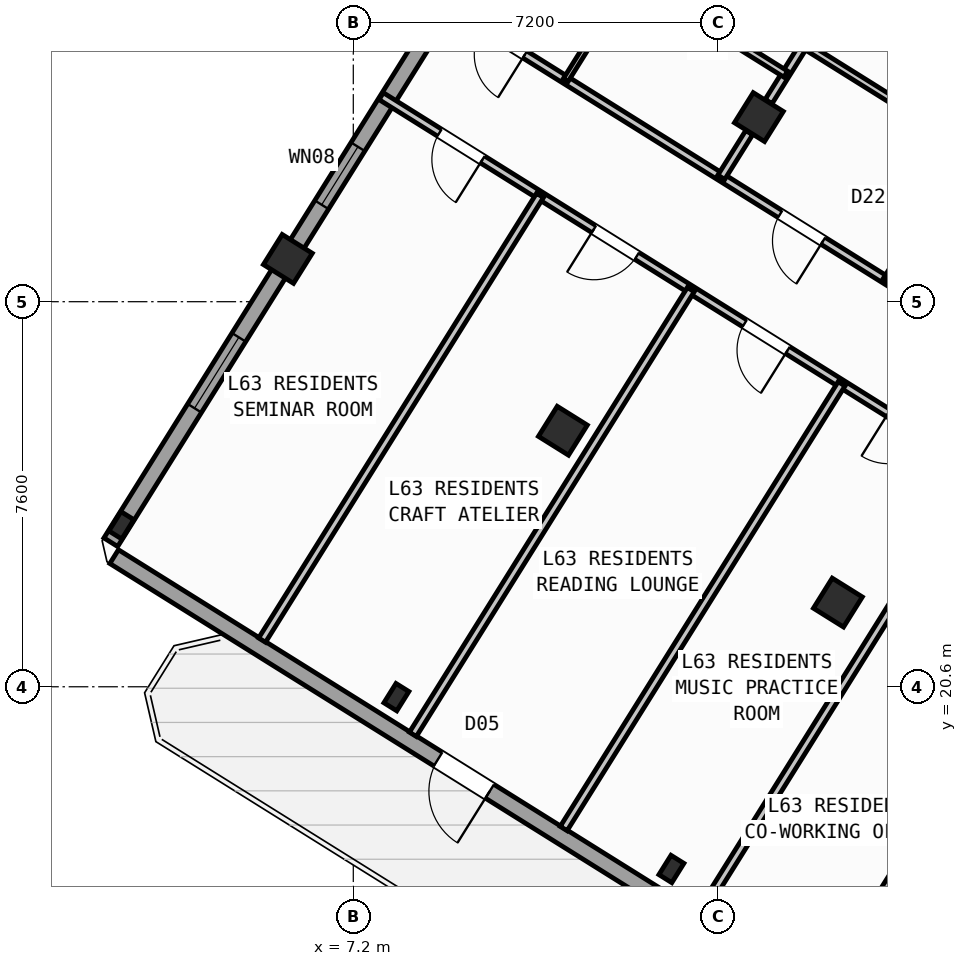
"""IFC4 building model, lengths in metres.
Left out: names, types, materials, properties, quantities, classifications, styles, units other than length and angle.
Written with IfcOpenShell. Run it as: python <this file> out.ifc"""

import sys

from ifc_helpers import new_model, si_unit, direction, frame, frame_2d, origin, origin_2d, place, context, subcontext, project, spatial, rectangle, hollow_rectangle, i_section, extrude, source, transform, mapped, element, fill, save


model = new_model("IFC4")
c1 = context("Model", 3, precision=1e-05, world=origin(), true_north=direction((0.0, 1.0)))
c2 = subcontext(c1, "Body", "Model", "MODEL_VIEW")
j1 = project(units=[si_unit("LENGTHUNIT", "METRE"), si_unit("PLANEANGLEUNIT", "RADIAN")], contexts=[c1])
p1 = place(None, origin())
s1 = spatial("IfcSite", under=j1, at=p1, CompositionType="ELEMENT")
p2 = place(p1, origin())
s2 = spatial("IfcBuilding", under=s1, at=p2, CompositionType="ELEMENT")
p3 = place(p2, frame((0.0, 0.0, 251.1)))
s3 = spatial("IfcBuildingStorey", under=s2, at=p3, CompositionType="ELEMENT", Elevation=251.1)
m1 = source(origin(), c2, "Body", "SweptSolid", [
    extrude(hollow_rectangle(XDim=0.7, YDim=0.7, WallThickness=0.028, at=origin_2d()), origin(), (0.0, 0.0, 1.0), 3.6),
])
p4 = place(p3, frame((16.764, 22.261, 0.0), z_axis=(0.0, 0.0, 1.0), x_axis=(-0.848048096156, 0.529919264233, 0.0)))
e1 = element("IfcColumn", 1, at=p4, inside=s3, PredefinedType="COLUMN", context=c2, shape_type="MappedRepresentation", body=[
    mapped(m1, transform((0.0, 0.0, 0.0), scale=1.0)),
])
m2 = source(origin(), c2, "Body", "SweptSolid", [
    extrude(i_section(OverallWidth=0.3, OverallDepth=0.45, WebThickness=0.014, FlangeThickness=0.026, at=origin_2d()), origin(), (0.0, 0.0, 1.0), 3.6),
])
p5 = place(p3, frame((13.478, 17.003, 0.0), z_axis=(0.0, 0.0, 1.0), x_axis=(-0.848048096156, 0.529919264233, 0.0)))
e2 = element("IfcColumn", 2, at=p5, inside=s3, PredefinedType="COLUMN", context=c2, shape_type="MappedRepresentation", body=[
    mapped(m2, transform((0.0, 0.0, 0.0), scale=1.0)),
])
for number, where, z_axis, x_axis in (
    (3, (15.205, 31.844, 0.0), (0.0, 0.0, 1.0), (-0.848, 0.53, 0.0)),
    (4, (11.336, 25.653, 0.0), (0.0, 0.0, 1.0), (-0.848, 0.53, 0.0)),
):
    element("IfcColumn", number, at=place(p3, frame(where, z_axis=z_axis, x_axis=x_axis)), inside=s3, PredefinedType="COLUMN", context=c2, shape_type="MappedRepresentation", body=[
        mapped(m1, transform((0.0, 0.0, 0.0), scale=1.0)),
    ])
p6 = place(p3, frame((8.051, 20.395, 0.0), z_axis=(0.0, 0.0, 1.0), x_axis=(-0.848048096156, 0.529919264233, 0.0)))
e5 = element("IfcColumn", 5, at=p6, inside=s3, PredefinedType="COLUMN", context=c2, shape_type="MappedRepresentation", body=[
    mapped(m2, transform((0.0, 0.0, 0.0), scale=1.0)),
])
p7 = place(p3, frame((5.909, 29.044, 0.0), z_axis=(0.0, 0.0, 1.0), x_axis=(-0.848048096156, 0.529919264233, 0.0)))
e6 = element("IfcColumn", 6, at=p7, inside=s3, PredefinedType="COLUMN", context=c2, shape_type="MappedRepresentation", body=[
    mapped(m1, transform((0.0, 0.0, 0.0), scale=1.0)),
])
p8 = place(p3, frame((2.623, 23.786, 0.0), z_axis=(0.0, 0.0, 1.0), x_axis=(-0.848048096156, 0.529919264233, 0.0)))
e7 = element("IfcColumn", 7, at=p8, inside=s3, PredefinedType="COLUMN", context=c2, shape_type="MappedRepresentation", body=[
    mapped(m2, transform((0.0, 0.0, 0.0), scale=1.0)),
])
p9 = place(p3, frame((29.268, 6.429, 0.0), z_axis=(0.0, 0.0, 1.0), x_axis=(-0.848049971435, 0.529916263149, 0.0)))
e8 = element("IfcWall", 8, at=p9, inside=s3, PredefinedType="STANDARD", context=c2, shape_type="SweptSolid", body=[
    extrude(rectangle(XDim=31.588, YDim=0.32, at=frame_2d((15.794, 0.0))), origin(), (0.0, 0.0, 1.0), 3.32),
])
p10 = place(p9, frame((22.848, 0.0, 0.0)))
e9 = element("IfcOpeningElement", 9, at=p10, cuts=e8, PredefinedType="OPENING", context=c2, shape_type="SweptSolid", body=[
    extrude(rectangle(XDim=1.2, YDim=2.15, at=frame_2d((0.6, 1.075))), frame((0.0, 0.17, 0.0), z_axis=(0.0, -1.0, 0.0), x_axis=(1.0, 0.0, 0.0)), (0.0, 0.0, 1.0), 0.34),
])
p11 = place(p9, frame((3.178, 0.0, 0.9)))
e10 = element("IfcOpeningElement", 10, at=p11, cuts=e8, PredefinedType="OPENING", context=c2, shape_type="SweptSolid", body=[
    extrude(rectangle(XDim=1.65, YDim=1.45, at=frame_2d((0.825, 0.725))), frame((0.0, 0.17, 0.0), z_axis=(0.0, -1.0, 0.0), x_axis=(1.0, 0.0, 0.0)), (0.0, 0.0, 1.0), 0.34),
])
p12 = place(p9, frame((8.478, 0.0, 0.9)))
e11 = element("IfcOpeningElement", 11, at=p12, cuts=e8, PredefinedType="OPENING", context=c2, shape_type="SweptSolid", body=[
    extrude(rectangle(XDim=1.65, YDim=1.45, at=frame_2d((0.825, 0.725))), frame((0.0, 0.17, 0.0), z_axis=(0.0, -1.0, 0.0), x_axis=(1.0, 0.0, 0.0)), (0.0, 0.0, 1.0), 0.34),
])
p13 = place(p3, frame((2.415, 23.452, 0.0), z_axis=(0.0, 0.0, 1.0), x_axis=(0.52991049553, 0.848053575387, 0.0)))
e12 = element("IfcWall", 12, at=p13, inside=s3, PredefinedType="STANDARD", context=c2, shape_type="SweptSolid", body=[
    extrude(rectangle(XDim=21.587, YDim=0.32, at=frame_2d((10.794, 0.0))), origin(), (0.0, 0.0, 1.0), 2.845),
])
p14 = place(p13, frame((3.119, 0.0, 0.9)))
e13 = element("IfcOpeningElement", 13, at=p14, cuts=e12, PredefinedType="OPENING", context=c2, shape_type="SweptSolid", body=[
    extrude(rectangle(XDim=1.65, YDim=1.45, at=frame_2d((0.825, 0.725))), frame((0.0, 0.17, 0.0), z_axis=(0.0, -1.0, 0.0), x_axis=(1.0, 0.0, 0.0)), (0.0, 0.0, 1.0), 0.34),
])
p15 = place(p13, frame((7.854, 0.0, 0.9)))
e14 = element("IfcOpeningElement", 14, at=p15, cuts=e12, PredefinedType="OPENING", context=c2, shape_type="SweptSolid", body=[
    extrude(rectangle(XDim=1.35, YDim=1.45, at=frame_2d((0.675, 0.725))), frame((0.0, 0.17, 0.0), z_axis=(0.0, -1.0, 0.0), x_axis=(1.0, 0.0, 0.0)), (0.0, 0.0, 1.0), 0.34),
])
p16 = place(p13, frame((16.979, 0.0, 0.95)))
e15 = element("IfcOpeningElement", 15, at=p16, cuts=e12, PredefinedType="OPENING", context=c2, shape_type="SweptSolid", body=[
    extrude(rectangle(XDim=1.95, YDim=1.35, at=frame_2d((0.975, 0.675))), frame((0.0, 0.17, 0.0), z_axis=(0.0, -1.0, 0.0), x_axis=(1.0, 0.0, 0.0)), (0.0, 0.0, 1.0), 0.34),
])
p17 = place(p3, frame((14.138, 41.825, 0.0), z_axis=(0.0, 0.0, 1.0), x_axis=(0.848046498049, -0.529921821731, 0.0)))
e16 = element("IfcWall", 16, at=p17, inside=s3, PredefinedType="STANDARD", context=c2, shape_type="SweptSolid", body=[
    extrude(rectangle(XDim=31.588, YDim=0.32, at=frame_2d((15.794, 0.0))), origin(), (0.0, 0.0, 1.0), 3.32),
])
p18 = place(p17, frame((3.46, 0.0, 0.0)))
e17 = element("IfcOpeningElement", 17, at=p18, cuts=e16, PredefinedType="OPENING", context=c2, shape_type="SweptSolid", body=[
    extrude(rectangle(XDim=1.05, YDim=2.15, at=frame_2d((0.525, 1.075))), frame((0.0, 0.17, 0.0), z_axis=(0.0, -1.0, 0.0), x_axis=(1.0, 0.0, 0.0)), (0.0, 0.0, 1.0), 0.34),
])
p19 = place(p17, frame((0.831, 0.0, 1.0)))
e18 = element("IfcOpeningElement", 18, at=p19, cuts=e16, PredefinedType="OPENING", context=c2, shape_type="SweptSolid", body=[
    extrude(rectangle(XDim=0.9, YDim=1.25, at=frame_2d((0.45, 0.625))), frame((0.0, 0.17, 0.0), z_axis=(0.0, -1.0, 0.0), x_axis=(1.0, 0.0, 0.0)), (0.0, 0.0, 1.0), 0.34),
])
p20 = place(p17, frame((9.837, 0.0, 0.9)))
e19 = element("IfcOpeningElement", 19, at=p20, cuts=e16, PredefinedType="OPENING", context=c2, shape_type="SweptSolid", body=[
    extrude(rectangle(XDim=1.35, YDim=1.45, at=frame_2d((0.675, 0.725))), frame((0.0, 0.17, 0.0), z_axis=(0.0, -1.0, 0.0), x_axis=(1.0, 0.0, 0.0)), (0.0, 0.0, 1.0), 0.34),
])
p21 = place(p17, frame((13.599, 0.0, 0.95)))
e20 = element("IfcOpeningElement", 20, at=p21, cuts=e16, PredefinedType="OPENING", context=c2, shape_type="SweptSolid", body=[
    extrude(rectangle(XDim=1.95, YDim=1.35, at=frame_2d((0.975, 0.675))), frame((0.0, 0.17, 0.0), z_axis=(0.0, -1.0, 0.0), x_axis=(1.0, 0.0, 0.0)), (0.0, 0.0, 1.0), 0.34),
])
p22 = place(p17, frame((17.154, 0.0, 1.0)))
e21 = element("IfcOpeningElement", 21, at=p22, cuts=e16, PredefinedType="OPENING", context=c2, shape_type="SweptSolid", body=[
    extrude(rectangle(XDim=0.9, YDim=1.25, at=frame_2d((0.45, 0.625))), frame((0.0, 0.17, 0.0), z_axis=(0.0, -1.0, 0.0), x_axis=(1.0, 0.0, 0.0)), (0.0, 0.0, 1.0), 0.34),
])
p23 = place(p17, frame((21.651, 0.0, 0.9)))
e22 = element("IfcOpeningElement", 22, at=p23, cuts=e16, PredefinedType="OPENING", context=c2, shape_type="SweptSolid", body=[
    extrude(rectangle(XDim=1.65, YDim=1.45, at=frame_2d((0.825, 0.725))), frame((0.0, 0.17, 0.0), z_axis=(0.0, -1.0, 0.0), x_axis=(1.0, 0.0, 0.0)), (0.0, 0.0, 1.0), 0.34),
])
p24 = place(p17, frame((27.215, 0.0, 0.9)))
e23 = element("IfcOpeningElement", 23, at=p24, cuts=e16, PredefinedType="OPENING", context=c2, shape_type="SweptSolid", body=[
    extrude(rectangle(XDim=1.65, YDim=1.45, at=frame_2d((0.825, 0.725))), frame((0.0, 0.17, 0.0), z_axis=(0.0, -1.0, 0.0), x_axis=(1.0, 0.0, 0.0)), (0.0, 0.0, 1.0), 0.34),
])
p25 = place(p3, frame((21.938, 23.391, 0.0), z_axis=(0.0, 0.0, 1.0), x_axis=(-0.529924725692, -0.848044683434, 0.0)))
e24 = element("IfcWall", 24, at=p25, inside=s3, PredefinedType="PARTITIONING", context=c2, shape_type="SweptSolid", body=[
    extrude(rectangle(XDim=10.35, YDim=0.16, at=frame_2d((5.175, 0.0))), origin(), (0.0, 0.0, 1.0), 3.31),
])
p26 = place(p3, frame((23.104, 25.256, 0.0), z_axis=(0.0, 0.0, 1.0), x_axis=(-0.848041752158, 0.529929416617, 0.0)))
e25 = element("IfcWall", 25, at=p26, inside=s3, PredefinedType="PARTITIONING", context=c2, shape_type="SweptSolid", body=[
    extrude(rectangle(XDim=16.73, YDim=0.16, at=frame_2d((8.365, 0.0))), origin(), (0.0, 0.0, 1.0), 3.31),
])
p27 = place(p26, frame((1.395, 0.0, 0.0)))
e26 = element("IfcOpeningElement", 26, at=p27, cuts=e25, PredefinedType="OPENING", context=c2, shape_type="SweptSolid", body=[
    extrude(rectangle(XDim=1.0, YDim=2.1, at=frame_2d((0.5, 1.05))), frame((0.0, 0.09, 0.0), z_axis=(0.0, -1.0, 0.0), x_axis=(1.0, 0.0, 0.0)), (0.0, 0.0, 1.0), 0.18),
])
p28 = place(p26, frame((7.82, 0.0, 0.0)))
e27 = element("IfcOpeningElement", 27, at=p28, cuts=e25, PredefinedType="OPENING", context=c2, shape_type="SweptSolid", body=[
    extrude(rectangle(XDim=1.0, YDim=2.1, at=frame_2d((0.5, 1.05))), frame((0.0, 0.09, 0.0), z_axis=(0.0, -1.0, 0.0), x_axis=(1.0, 0.0, 0.0)), (0.0, 0.0, 1.0), 0.18),
])
p29 = place(p26, frame((14.76, 0.0, 0.0)))
e28 = element("IfcOpeningElement", 28, at=p29, cuts=e25, PredefinedType="OPENING", context=c2, shape_type="SweptSolid", body=[
    extrude(rectangle(XDim=1.0, YDim=2.1, at=frame_2d((0.5, 1.05))), frame((0.0, 0.09, 0.0), z_axis=(0.0, -1.0, 0.0), x_axis=(1.0, 0.0, 0.0)), (0.0, 0.0, 1.0), 0.18),
])
p30 = place(p3, frame((21.938, 23.391, 0.0), z_axis=(0.0, 0.0, 1.0), x_axis=(-0.848045850158, 0.529922858565, 0.0)))
e29 = element("IfcWall", 29, at=p30, inside=s3, PredefinedType="PARTITIONING", context=c2, shape_type="SweptSolid", body=[
    extrude(rectangle(XDim=16.73, YDim=0.16, at=frame_2d((8.365, 0.0))), origin(), (0.0, 0.0, 1.0), 3.31),
])
p31 = place(p30, frame((0.92, 0.0, 0.0)))
e30 = element("IfcOpeningElement", 30, at=p31, cuts=e29, PredefinedType="OPENING", context=c2, shape_type="SweptSolid", body=[
    extrude(rectangle(XDim=1.0, YDim=2.1, at=frame_2d((0.5, 1.05))), frame((0.0, 0.09, 0.0), z_axis=(0.0, -1.0, 0.0), x_axis=(1.0, 0.0, 0.0)), (0.0, 0.0, 1.0), 0.18),
])
p32 = place(p30, frame((3.928, 0.0, 0.0)))
e31 = element("IfcOpeningElement", 31, at=p32, cuts=e29, PredefinedType="OPENING", context=c2, shape_type="SweptSolid", body=[
    extrude(rectangle(XDim=1.0, YDim=2.1, at=frame_2d((0.5, 1.05))), frame((0.0, 0.09, 0.0), z_axis=(0.0, -1.0, 0.0), x_axis=(1.0, 0.0, 0.0)), (0.0, 0.0, 1.0), 0.18),
])
p33 = place(p30, frame((7.271, 0.0, 0.0)))
e32 = element("IfcOpeningElement", 32, at=p33, cuts=e29, PredefinedType="OPENING", context=c2, shape_type="SweptSolid", body=[
    extrude(rectangle(XDim=1.0, YDim=2.1, at=frame_2d((0.5, 1.05))), frame((0.0, 0.09, 0.0), z_axis=(0.0, -1.0, 0.0), x_axis=(1.0, 0.0, 0.0)), (0.0, 0.0, 1.0), 0.18),
])
p34 = place(p30, frame((10.78, 0.0, 0.0)))
e33 = element("IfcOpeningElement", 33, at=p34, cuts=e29, PredefinedType="OPENING", context=c2, shape_type="SweptSolid", body=[
    extrude(rectangle(XDim=1.0, YDim=2.1, at=frame_2d((0.5, 1.05))), frame((0.0, 0.09, 0.0), z_axis=(0.0, -1.0, 0.0), x_axis=(1.0, 0.0, 0.0)), (0.0, 0.0, 1.0), 0.18),
])
p35 = place(p30, frame((14.372, 0.0, 0.0)))
e34 = element("IfcOpeningElement", 34, at=p35, cuts=e29, PredefinedType="OPENING", context=c2, shape_type="SweptSolid", body=[
    extrude(rectangle(XDim=1.0, YDim=2.1, at=frame_2d((0.5, 1.05))), frame((0.0, 0.09, 0.0), z_axis=(0.0, -1.0, 0.0), x_axis=(1.0, 0.0, 0.0)), (0.0, 0.0, 1.0), 0.18),
])
p36 = place(p3, frame((19.529, 24.896, 0.0), z_axis=(0.0, 0.0, 1.0), x_axis=(-0.529914125013, -0.848051307476, 0.0)))
e35 = element("IfcWall", 35, at=p36, inside=s3, PredefinedType="PARTITIONING", context=c2, shape_type="SweptSolid", body=[
    extrude(rectangle(XDim=10.35, YDim=0.16, at=frame_2d((5.175, 0.0))), origin(), (0.0, 0.0, 1.0), 3.31),
])
p37 = place(p3, frame((16.837, 26.579, 0.0), z_axis=(0.0, 0.0, 1.0), x_axis=(-0.529941690036, -0.848034082547, 0.0)))
e36 = element("IfcWall", 36, at=p37, inside=s3, PredefinedType="PARTITIONING", context=c2, shape_type="SweptSolid", body=[
    extrude(rectangle(XDim=10.35, YDim=0.16, at=frame_2d((5.175, 0.0))), origin(), (0.0, 0.0, 1.0), 2.935),
])
p38 = place(p3, frame((13.861, 28.438, 0.0), z_axis=(0.0, 0.0, 1.0), x_axis=(-0.529931089283, -0.848040706931, 0.0)))
e37 = element("IfcWall", 37, at=p38, inside=s3, PredefinedType="PARTITIONING", context=c2, shape_type="SweptSolid", body=[
    extrude(rectangle(XDim=10.35, YDim=0.16, at=frame_2d((5.175, 0.0))), origin(), (0.0, 0.0, 1.0), 3.31),
])
p39 = place(p3, frame((10.885, 30.298, 0.0), z_axis=(0.0, 0.0, 1.0), x_axis=(-0.529924725692, -0.848044683434, 0.0)))
e38 = element("IfcWall", 38, at=p39, inside=s3, PredefinedType="PARTITIONING", context=c2, shape_type="SweptSolid", body=[
    extrude(rectangle(XDim=10.35, YDim=0.16, at=frame_2d((5.175, 0.0))), origin(), (0.0, 0.0, 1.0), 3.31),
])
p40 = place(p3, frame((18.881, 37.727, 0.0), z_axis=(0.0, 0.0, 1.0), x_axis=(-0.529938869374, -0.84803584519, 0.0)))
e39 = element("IfcWall", 39, at=p40, inside=s3, PredefinedType="PARTITIONING", context=c2, shape_type="SweptSolid", body=[
    extrude(rectangle(XDim=6.576, YDim=0.16, at=frame_2d((3.288, 0.0))), origin(), (0.0, 0.0, 1.0), 2.845),
])
p41 = place(p3, frame((15.013, 31.537, 0.0), z_axis=(0.0, 0.0, 1.0), x_axis=(-0.529872092657, -0.848077570405, 0.0)))
e40 = element("IfcWall", 40, at=p41, inside=s3, PredefinedType="PARTITIONING", context=c2, shape_type="SweptSolid", body=[
    extrude(rectangle(XDim=1.038, YDim=0.16, at=frame_2d((0.519, 0.0))), origin(), (0.0, 0.0, 1.0), 2.845),
])
p42 = place(p3, frame((21.522, 29.877, 0.0), z_axis=(0.0, 0.0, 1.0), x_axis=(-0.848039019877, 0.529933789039, 0.0)))
e41 = element("IfcWall", 41, at=p42, inside=s3, PredefinedType="PLUMBINGWALL", context=c2, shape_type="SweptSolid", body=[
    extrude(rectangle(XDim=6.4, YDim=0.14, at=frame_2d((3.2, 0.0))), origin(), (0.0, 0.0, 1.0), 3.31),
])
p43 = place(p42, frame((2.824, 0.0, 0.0)))
e42 = element("IfcOpeningElement", 42, at=p43, cuts=e41, PredefinedType="OPENING", context=c2, shape_type="SweptSolid", body=[
    extrude(rectangle(XDim=0.78, YDim=2.05, at=frame_2d((0.39, 1.025))), frame((0.0, 0.08, 0.0), z_axis=(0.0, -1.0, 0.0), x_axis=(1.0, 0.0, 0.0)), (0.0, 0.0, 1.0), 0.16),
])
p44 = place(p3, frame((19.351, 31.233, 0.0), z_axis=(0.0, 0.0, 1.0), x_axis=(-0.52989206052, -0.848065094316, 0.0)))
e43 = element("IfcWall", 43, at=p44, inside=s3, PredefinedType="PLUMBINGWALL", context=c2, shape_type="SweptSolid", body=[
    extrude(rectangle(XDim=3.08, YDim=0.14, at=frame_2d((1.54, 0.0))), origin(), (0.0, 0.0, 1.0), 3.31),
])
p45 = place(p44, frame((1.15, 0.0, 0.0)))
e44 = element("IfcOpeningElement", 44, at=p45, cuts=e43, PredefinedType="OPENING", context=c2, shape_type="SweptSolid", body=[
    extrude(rectangle(XDim=0.78, YDim=2.05, at=frame_2d((0.39, 1.025))), frame((0.0, 0.08, 0.0), z_axis=(0.0, -1.0, 0.0), x_axis=(1.0, 0.0, 0.0)), (0.0, 0.0, 1.0), 0.16),
])
p46 = place(p3, frame((16.385, 40.563, 0.0), z_axis=(0.0, 0.0, 1.0), x_axis=(-0.529931378574, -0.848040526156, 0.0)))
e45 = element("IfcWall", 45, at=p46, inside=s3, PredefinedType="PARTITIONING", context=c2, shape_type="SweptSolid", body=[
    extrude(rectangle(XDim=9.42, YDim=0.11, at=frame_2d((4.71, 0.0))), origin(), (0.0, 0.0, 1.0), 3.31),
])
p47 = place(p46, frame((7.78, 0.0, 0.0)))
e46 = element("IfcOpeningElement", 46, at=p47, cuts=e45, PredefinedType="OPENING", context=c2, shape_type="SweptSolid", body=[
    extrude(rectangle(XDim=0.78, YDim=2.05, at=frame_2d((0.39, 1.025))), frame((0.0, 0.065, 0.0), z_axis=(0.0, -1.0, 0.0), x_axis=(1.0, 0.0, 0.0)), (0.0, 0.0, 1.0), 0.13),
])
p48 = place(p46, frame((3.05, 0.0, 0.0)))
e47 = element("IfcOpeningElement", 47, at=p48, cuts=e45, PredefinedType="OPENING", context=c2, shape_type="SweptSolid", body=[
    extrude(rectangle(XDim=0.92, YDim=2.08, at=frame_2d((0.46, 1.04))), frame((0.0, 0.065, 0.0), z_axis=(0.0, -1.0, 0.0), x_axis=(1.0, 0.0, 0.0)), (0.0, 0.0, 1.0), 0.13),
])
p49 = place(p3, frame((15.734, 32.692, 0.0), z_axis=(0.0, 0.0, 1.0), x_axis=(-0.848051346257, 0.52991406295, 0.0)))
e48 = element("IfcWall", 48, at=p49, inside=s3, PredefinedType="PLUMBINGWALL", context=c2, shape_type="SweptSolid", body=[
    extrude(rectangle(XDim=3.62, YDim=0.14, at=frame_2d((1.81, 0.0))), origin(), (0.0, 0.0, 1.0), 3.31),
])
m3 = source(origin(), c2, "Body", "SweptSolid", [
    extrude(rectangle(XDim=1.2, YDim=2.15, at=frame_2d((0.6, 1.075))), frame((0.0, 0.025, 0.0), z_axis=(0.0, -1.0, 0.0), x_axis=(1.0, 0.0, 0.0)), (0.0, 0.0, 1.0), 0.05),
])
p50 = place(p10, origin())
e49 = element("IfcDoor", 49, at=p50, inside=s3, OperationType="SINGLE_SWING_LEFT", PredefinedType="DOOR", context=c2, shape_type="MappedRepresentation", body=[
    mapped(m3, transform((0.0, 0.0, 0.0), scale=1.0)),
])
fill(e9, e49)
m4 = source(origin(), c2, "Body", "SweptSolid", [
    extrude(rectangle(XDim=1.65, YDim=1.45, at=frame_2d((0.825, 0.725))), frame((0.0, 0.03, 0.0), z_axis=(0.0, -1.0, 0.0), x_axis=(1.0, 0.0, 0.0)), (0.0, 0.0, 1.0), 0.06),
])
p51 = place(p14, origin())
e50 = element("IfcWindow", 50, at=p51, inside=s3, PartitioningType="SINGLE_PANEL", PredefinedType="WINDOW", context=c2, shape_type="MappedRepresentation", body=[
    mapped(m4, transform((0.0, 0.0, 0.0), scale=1.0)),
])
fill(e13, e50)
m5 = source(origin(), c2, "Body", "SweptSolid", [
    extrude(rectangle(XDim=1.35, YDim=1.45, at=frame_2d((0.675, 0.725))), frame((0.0, 0.03, 0.0), z_axis=(0.0, -1.0, 0.0), x_axis=(1.0, 0.0, 0.0)), (0.0, 0.0, 1.0), 0.06),
])
p52 = place(p15, origin())
e51 = element("IfcWindow", 51, at=p52, inside=s3, PartitioningType="SINGLE_PANEL", PredefinedType="WINDOW", context=c2, shape_type="MappedRepresentation", body=[
    mapped(m5, transform((0.0, 0.0, 0.0), scale=1.0)),
])
fill(e14, e51)
m6 = source(origin(), c2, "Body", "SweptSolid", [
    extrude(rectangle(XDim=1.0, YDim=2.1, at=frame_2d((0.5, 1.05))), frame((0.0, 0.025, 0.0), z_axis=(0.0, -1.0, 0.0), x_axis=(1.0, 0.0, 0.0)), (0.0, 0.0, 1.0), 0.05),
])
p53 = place(p33, origin())
e52 = element("IfcDoor", 52, at=p53, inside=s3, OperationType="SINGLE_SWING_LEFT", PredefinedType="DOOR", context=c2, shape_type="MappedRepresentation", body=[
    mapped(m6, transform((0.0, 0.0, 0.0), scale=1.0)),
])
fill(e32, e52)
p54 = place(p34, origin())
e53 = element("IfcDoor", 53, at=p54, inside=s3, OperationType="SINGLE_SWING_RIGHT", PredefinedType="DOOR", context=c2, shape_type="MappedRepresentation", body=[
    mapped(m6, transform((0.0, 0.0, 0.0), scale=1.0)),
])
fill(e33, e53)
p55 = place(p35, origin())
e54 = element("IfcDoor", 54, at=p55, inside=s3, OperationType="SINGLE_SWING_LEFT", PredefinedType="DOOR", context=c2, shape_type="MappedRepresentation", body=[
    mapped(m6, transform((0.0, 0.0, 0.0), scale=1.0)),
])
fill(e34, e54)
p56 = place(p28, origin())
e55 = element("IfcDoor", 55, at=p56, inside=s3, OperationType="SINGLE_SWING_LEFT", PredefinedType="DOOR", context=c2, shape_type="MappedRepresentation", body=[
    mapped(m6, transform((0.0, 0.0, 0.0), scale=1.0)),
])
fill(e27, e55)
p57 = place(p29, origin())
e56 = element("IfcDoor", 56, at=p57, inside=s3, OperationType="SINGLE_SWING_LEFT", PredefinedType="DOOR", context=c2, shape_type="MappedRepresentation", body=[
    mapped(m6, transform((0.0, 0.0, 0.0), scale=1.0)),
])
fill(e28, e56)
save(model, sys.argv[1])
